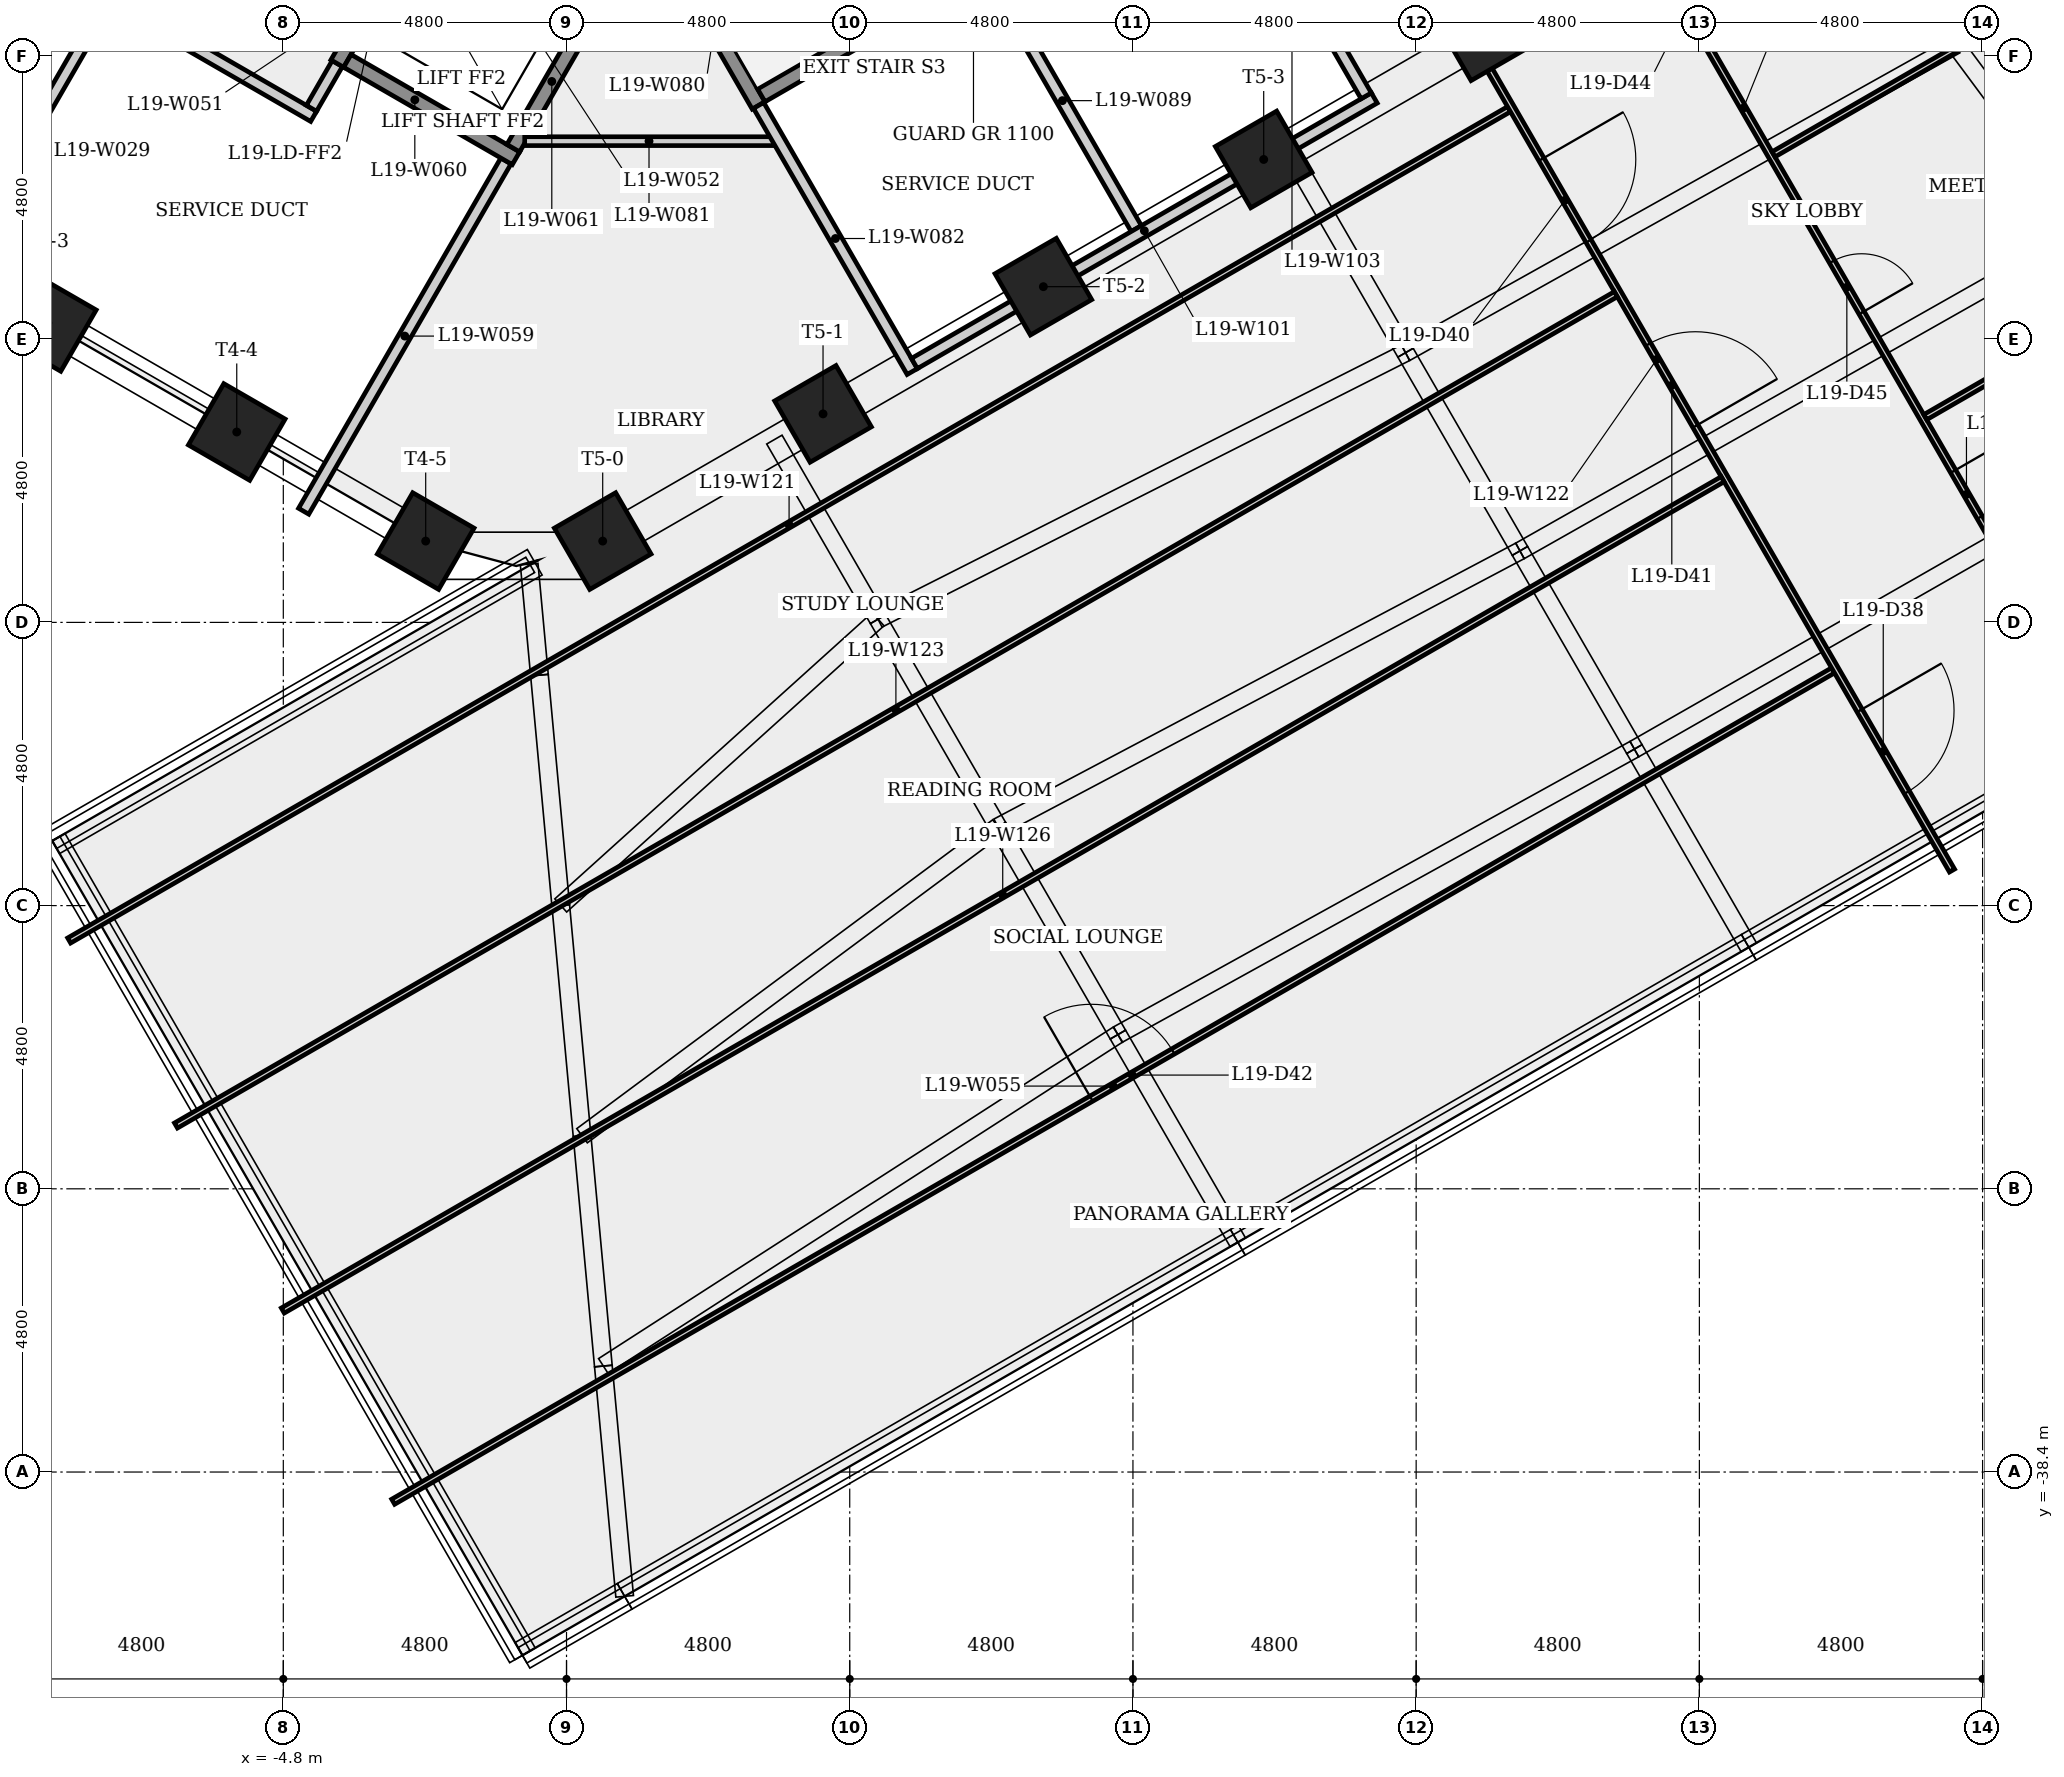
"""IFC4 building model, lengths in metres.
Left out: names, types, materials, properties, quantities, classifications, styles, units other than length and angle.
Written with IfcOpenShell. Run it as: python <this file> out.ifc"""

import sys

from ifc_helpers import new_model, si_unit, direction, frame, frame_2d, origin, origin_2d, place, context, subcontext, project, spatial, rectangle, extrude, element, fill, save


model = new_model("IFC4")
c1 = context("Model", 3, precision=1e-05, world=origin(), true_north=direction((0.0, 1.0)))
c2 = subcontext(c1, "Body", "Model", "MODEL_VIEW")
j1 = project(units=[si_unit("LENGTHUNIT", "METRE"), si_unit("PLANEANGLEUNIT", "RADIAN")], contexts=[c1])
p1 = place(None, origin())
s1 = spatial("IfcSite", under=j1, at=p1, CompositionType="ELEMENT")
p2 = place(p1, origin())
s2 = spatial("IfcBuilding", under=s1, at=p2, CompositionType="ELEMENT")
p3 = place(p2, frame((0.0, 0.0, 74.3)))
s3 = spatial("IfcBuildingStorey", under=s2, at=p3, CompositionType="ELEMENT", Elevation=74.3)
for number, where, z_axis, x_axis in (
    (1, (-8.791, -18.924, 0.0), (0.0, 0.0, 1.0), (-0.5, -0.866, 0.0)),
    (2, (-5.589, -20.773, 0.0), (0.0, 0.0, 1.0), (-0.5, -0.866, 0.0)),
    (3, (-2.387, -22.622, 0.0), (0.0, 0.0, 1.0), (-0.5, -0.866, 0.0)),
    (4, (0.613, -22.622, 0.0), (0.0, 0.0, 1.0), (0.5, -0.866, 0.0)),
    (5, (4.348, -20.466, 0.0), (0.0, 0.0, 1.0), (0.5, -0.866, 0.0)),
    (6, (8.082, -18.31, 0.0), (0.0, 0.0, 1.0), (0.5, -0.866, 0.0)),
    (7, (11.816, -16.154, 0.0), (0.0, 0.0, 1.0), (0.5, -0.866, 0.0)),
    (8, (15.55, -13.998, 0.0), (0.0, 0.0, 1.0), (0.5, -0.866, 0.0)),
):
    element("IfcColumn", number, at=place(p3, frame(where, z_axis=z_axis, x_axis=x_axis)), inside=s3, PredefinedType="COLUMN", context=c2, shape_type="SweptSolid", body=[
        extrude(rectangle(XDim=1.2, YDim=1.2, at=origin_2d()), origin(), (0.0, 0.0, 1.0), 4.0),
    ])
p4 = place(p3, frame((-7.8, -13.51, 0.0), z_axis=(0.0, 0.0, 1.0), x_axis=(-0.499982030767, -0.866035778077, 0.0)))
e9 = element("IfcWall", 9, at=p4, inside=s3, PredefinedType="PLUMBINGWALL", context=c2, shape_type="SweptSolid", body=[
    extrude(rectangle(XDim=5.781, YDim=0.2, at=frame_2d((2.89, 0.0))), origin(), (0.0, 0.0, 1.0), 3.6),
])
p5 = place(p3, frame((-8.356, -13.073, 0.0), z_axis=(0.0, 0.0, 1.0), x_axis=(0.866038532462, -0.499977259774, 0.0)))
e10 = element("IfcWall", 10, at=p5, inside=s3, PredefinedType="PLUMBINGWALL", context=c2, shape_type="SweptSolid", body=[
    extrude(rectangle(XDim=4.7, YDim=0.2, at=frame_2d((2.35, 0.0))), origin(), (0.0, 0.0, 1.0), 3.6),
])
p6 = place(p3, frame((-3.885, -14.529, 0.0), z_axis=(0.0, 0.0, 1.0), x_axis=(-0.499859285417, -0.866106630146, 0.0)))
e11 = element("IfcWall", 11, at=p6, inside=s3, PredefinedType="PLUMBINGWALL", context=c2, shape_type="SweptSolid", body=[
    extrude(rectangle(XDim=0.875, YDim=0.2, at=frame_2d((0.438, 0.0))), origin(), (0.0, 0.0, 1.0), 3.6),
])
p7 = place(p3, frame((-2.41, -11.974, 0.0), z_axis=(0.0, 0.0, 1.0), x_axis=(-0.500001826776, -0.866024349092, 0.0)))
e12 = element("IfcWall", 12, at=p7, inside=s3, PredefinedType="SHEAR", context=c2, shape_type="SweptSolid", body=[
    extrude(rectangle(XDim=2.95, YDim=0.25, at=frame_2d((1.475, 0.0))), origin(), (0.0, 0.0, 1.0), 3.6),
])
p8 = place(p7, frame((0.925, 0.0, 0.0)))
e13 = element("IfcOpeningElement", 13, at=p8, cuts=e12, PredefinedType="OPENING", context=c2, shape_type="SweptSolid", body=[
    extrude(rectangle(XDim=1.1, YDim=2.1, at=frame_2d((0.55, 1.05))), frame((0.0, 0.135, 0.0), z_axis=(0.0, -1.0, 0.0), x_axis=(1.0, 0.0, 0.0)), (0.0, 0.0, 1.0), 0.27),
])
p9 = place(p3, frame((-2.938, -38.904, 0.0), z_axis=(0.0, 0.0, 1.0), x_axis=(0.866026157323, 0.49999869483, 0.0)))
e14 = element("IfcWall", 14, at=p9, inside=s3, PredefinedType="PARTITIONING", context=c2, shape_type="SweptSolid", body=[
    extrude(rectangle(XDim=28.179, YDim=0.1, at=frame_2d((14.089, 0.0))), origin(), (0.0, 0.0, 1.0), 3.6),
])
p10 = place(p9, frame((13.662, 0.0, 0.0)))
e15 = element("IfcOpeningElement", 15, at=p10, cuts=e14, PredefinedType="OPENING", context=c2, shape_type="SweptSolid", body=[
    extrude(rectangle(XDim=1.6, YDim=2.1, at=frame_2d((0.8, 1.05))), frame((0.0, 0.06, 0.0), z_axis=(0.0, -1.0, 0.0), x_axis=(1.0, 0.0, 0.0)), (0.0, 0.0, 1.0), 0.12),
])
p11 = place(p3, frame((-1.027, -16.179, 0.0), z_axis=(0.0, 0.0, 1.0), x_axis=(-0.499984476993, -0.866034365811, 0.0)))
e16 = element("IfcWall", 16, at=p11, inside=s3, PredefinedType="PLUMBINGWALL", context=c2, shape_type="SweptSolid", body=[
    extrude(rectangle(XDim=6.856, YDim=0.2, at=frame_2d((3.428, 0.0))), origin(), (0.0, 0.0, 1.0), 3.6),
])
p12 = place(p3, frame((-0.856, -16.133, 0.0), z_axis=(0.0, 0.0, 1.0), x_axis=(-0.866021716278, 0.500006386895, 0.0)))
e17 = element("IfcWall", 17, at=p12, inside=s3, PredefinedType="SHEAR", context=c2, shape_type="SweptSolid", body=[
    extrude(rectangle(XDim=3.3, YDim=0.25, at=frame_2d((1.65, 0.0))), origin(), (0.0, 0.0, 1.0), 3.6),
])
p13 = place(p3, frame((-0.902, -15.962, 0.0), z_axis=(0.0, 0.0, 1.0), x_axis=(0.499981517636, 0.866036074319, 0.0)))
e18 = element("IfcWall", 18, at=p13, inside=s3, PredefinedType="SHEAR", context=c2, shape_type="SweptSolid", body=[
    extrude(rectangle(XDim=2.61, YDim=0.25, at=frame_2d((1.305, 0.0))), origin(), (0.0, 0.0, 1.0), 3.6),
])
p14 = place(p3, frame((3.256, -15.239, 0.0), z_axis=(0.0, 0.0, 1.0), x_axis=(-0.50002537861, 0.866010750942, 0.0)))
e19 = element("IfcWall", 19, at=p14, inside=s3, PredefinedType="SHEAR", context=c2, shape_type="SweptSolid", body=[
    extrude(rectangle(XDim=3.0, YDim=0.25, at=frame_2d((1.5, 0.0))), origin(), (0.0, 0.0, 1.0), 3.6),
])
p15 = place(p3, frame((3.505, -15.844, 0.0), z_axis=(0.0, 0.0, 1.0), x_axis=(-1.0, 0.0, 0.0)))
e20 = element("IfcWall", 20, at=p15, inside=s3, PredefinedType="PARTITIONING", context=c2, shape_type="SweptSolid", body=[
    extrude(rectangle(XDim=4.214, YDim=0.15, at=frame_2d((2.107, 0.0))), origin(), (0.0, 0.0, 1.0), 3.6),
])
p16 = place(p3, frame((3.256, -15.239, 0.0), z_axis=(0.0, 0.0, 1.0), x_axis=(0.500021393879, -0.866013051671, 0.0)))
e21 = element("IfcWall", 21, at=p16, inside=s3, PredefinedType="PLUMBINGWALL", context=c2, shape_type="SweptSolid", body=[
    extrude(rectangle(XDim=5.208, YDim=0.2, at=frame_2d((2.604, 0.0))), origin(), (0.0, 0.0, 1.0), 3.6),
])
p17 = place(p3, frame((7.153, -12.989, 0.0), z_axis=(0.0, 0.0, 1.0), x_axis=(0.499998165157, -0.866026463129, 0.0)))
e22 = element("IfcWall", 22, at=p17, inside=s3, PredefinedType="PLUMBINGWALL", context=c2, shape_type="SweptSolid", body=[
    extrude(rectangle(XDim=5.008, YDim=0.2, at=frame_2d((2.504, 0.0))), origin(), (0.0, 0.0, 1.0), 3.6),
])
p18 = place(p3, frame((3.301, -15.068, 0.0), z_axis=(0.0, 0.0, 1.0), x_axis=(0.866035036182, 0.499983315828, 0.0)))
e23 = element("IfcWall", 23, at=p18, inside=s3, PredefinedType="SHEAR", context=c2, shape_type="SweptSolid", body=[
    extrude(rectangle(XDim=6.4, YDim=0.25, at=frame_2d((3.2, 0.0))), origin(), (0.0, 0.0, 1.0), 4.0),
])
p19 = place(p3, frame((5.896, -19.612, 0.0), z_axis=(0.0, 0.0, 1.0), x_axis=(0.866024315419, 0.5000018851, 0.0)))
e24 = element("IfcWall", 24, at=p19, inside=s3, PredefinedType="PLUMBINGWALL", context=c2, shape_type="SweptSolid", body=[
    extrude(rectangle(XDim=9.0, YDim=0.2, at=frame_2d((4.5, 0.0))), origin(), (0.0, 0.0, 1.0), 2.675),
])
p20 = place(p3, frame((11.037, -10.717, 0.0), z_axis=(0.0, 0.0, 1.0), x_axis=(0.500005202617, -0.866022400031, 0.0)))
e25 = element("IfcWall", 25, at=p20, inside=s3, PredefinedType="PLUMBINGWALL", context=c2, shape_type="SweptSolid", body=[
    extrude(rectangle(XDim=5.033, YDim=0.2, at=frame_2d((2.516, 0.0))), origin(), (0.0, 0.0, 1.0), 3.6),
])
p21 = place(p3, frame((15.439, -7.476, 0.0), z_axis=(0.0, 0.0, 1.0), x_axis=(0.499994416698, -0.866028627281, 0.0)))
e26 = element("IfcWall", 26, at=p21, inside=s3, PredefinedType="PARTITIONING", context=c2, shape_type="SweptSolid", body=[
    extrude(rectangle(XDim=18.028, YDim=0.1, at=frame_2d((9.014, 0.0))), origin(), (0.0, 0.0, 1.0), 3.6),
])
p22 = place(p21, frame((1.633, 0.0, 0.0)))
e27 = element("IfcOpeningElement", 27, at=p22, cuts=e26, PredefinedType="OPENING", context=c2, shape_type="SweptSolid", body=[
    extrude(rectangle(XDim=0.9, YDim=2.1, at=frame_2d((0.45, 1.05))), frame((0.0, 0.06, 0.0), z_axis=(0.0, -1.0, 0.0), x_axis=(1.0, 0.0, 0.0)), (0.0, 0.0, 1.0), 0.12),
])
p23 = place(p21, frame((6.572, 0.0, 0.0)))
e28 = element("IfcOpeningElement", 28, at=p23, cuts=e26, PredefinedType="OPENING", context=c2, shape_type="SweptSolid", body=[
    extrude(rectangle(XDim=1.0, YDim=2.1, at=frame_2d((0.5, 1.05))), frame((0.0, 0.06, 0.0), z_axis=(0.0, -1.0, 0.0), x_axis=(1.0, 0.0, 0.0)), (0.0, 0.0, 1.0), 0.12),
])
p24 = place(p21, frame((12.02, 0.0, 0.0)))
e29 = element("IfcOpeningElement", 29, at=p24, cuts=e26, PredefinedType="OPENING", context=c2, shape_type="SweptSolid", body=[
    extrude(rectangle(XDim=1.0, YDim=2.1, at=frame_2d((0.5, 1.05))), frame((0.0, 0.06, 0.0), z_axis=(0.0, -1.0, 0.0), x_axis=(1.0, 0.0, 0.0)), (0.0, 0.0, 1.0), 0.12),
])
p25 = place(p21, frame((16.125, 0.0, 0.0)))
e30 = element("IfcOpeningElement", 30, at=p25, cuts=e26, PredefinedType="OPENING", context=c2, shape_type="SweptSolid", body=[
    extrude(rectangle(XDim=0.9, YDim=2.1, at=frame_2d((0.45, 1.05))), frame((0.0, 0.06, 0.0), z_axis=(0.0, -1.0, 0.0), x_axis=(1.0, 0.0, 0.0)), (0.0, 0.0, 1.0), 0.12),
])
p26 = place(p3, frame((15.974, -15.302, 0.0), z_axis=(0.0, 0.0, 1.0), x_axis=(-0.866022405705, -0.500005192789, 0.0)))
e31 = element("IfcWall", 31, at=p26, inside=s3, PredefinedType="PARTITIONING", context=c2, shape_type="SweptSolid", body=[
    extrude(rectangle(XDim=28.179, YDim=0.1, at=frame_2d((14.089, 0.0))), origin(), (0.0, 0.0, 1.0), 3.6),
])
p27 = place(p3, frame((13.476, -10.876, 0.0), z_axis=(0.0, 0.0, 1.0), x_axis=(0.500008654708, -0.866020406929, 0.0)))
e32 = element("IfcWall", 32, at=p27, inside=s3, PredefinedType="PARTITIONING", context=c2, shape_type="SweptSolid", body=[
    extrude(rectangle(XDim=20.011, YDim=0.1, at=frame_2d((10.005, 0.0))), origin(), (0.0, 0.0, 1.0), 3.6),
])
p28 = place(p27, frame((16.88, 0.0, 0.0)))
e33 = element("IfcOpeningElement", 33, at=p28, cuts=e32, PredefinedType="OPENING", context=c2, shape_type="SweptSolid", body=[
    extrude(rectangle(XDim=1.6, YDim=2.1, at=frame_2d((0.8, 1.05))), frame((0.0, 0.06, 0.0), z_axis=(0.0, -1.0, 0.0), x_axis=(1.0, 0.0, 0.0)), (0.0, 0.0, 1.0), 0.12),
])
p29 = place(p27, frame((1.426, 0.0, 0.0)))
e34 = element("IfcOpeningElement", 34, at=p29, cuts=e32, PredefinedType="OPENING", context=c2, shape_type="SweptSolid", body=[
    extrude(rectangle(XDim=1.6, YDim=2.1, at=frame_2d((0.8, 1.05))), frame((0.0, 0.06, 0.0), z_axis=(0.0, -1.0, 0.0), x_axis=(1.0, 0.0, 0.0)), (0.0, 0.0, 1.0), 0.12),
])
p30 = place(p27, frame((6.092, 0.0, 0.0)))
e35 = element("IfcOpeningElement", 35, at=p30, cuts=e32, PredefinedType="OPENING", context=c2, shape_type="SweptSolid", body=[
    extrude(rectangle(XDim=1.6, YDim=2.1, at=frame_2d((0.8, 1.05))), frame((0.0, 0.06, 0.0), z_axis=(0.0, -1.0, 0.0), x_axis=(1.0, 0.0, 0.0)), (0.0, 0.0, 1.0), 0.12),
])
p31 = place(p27, frame((9.713, 0.0, 0.0)))
e36 = element("IfcOpeningElement", 36, at=p31, cuts=e32, PredefinedType="OPENING", context=c2, shape_type="SweptSolid", body=[
    extrude(rectangle(XDim=1.6, YDim=2.1, at=frame_2d((0.8, 1.05))), frame((0.0, 0.06, 0.0), z_axis=(0.0, -1.0, 0.0), x_axis=(1.0, 0.0, 0.0)), (0.0, 0.0, 1.0), 0.12),
])
for number, where, z_axis, x_axis in (
    (37, (17.784, -18.438, 0.0), (0.0, 0.0, 1.0), (-0.866, -0.5, 0.0)),
    (38, (19.595, -21.574, 0.0), (0.0, 0.0, 1.0), (-0.866, -0.5, 0.0)),
):
    element("IfcWall", number, at=place(p3, frame(where, z_axis=z_axis, x_axis=x_axis)), inside=s3, PredefinedType="PARTITIONING", context=c2, shape_type="SweptSolid", body=[
        extrude(rectangle(XDim=28.178, YDim=0.1, at=frame_2d((14.089, 0.0))), origin(), (0.0, 0.0, 1.0), 3.275),
    ])
p32 = place(p3, frame((26.964, -12.31, 0.0), z_axis=(0.0, 0.0, 1.0), x_axis=(-0.866032992878, -0.499986855073, 0.0)))
e39 = element("IfcWall", 39, at=p32, inside=s3, PredefinedType="PARTITIONING", context=c2, shape_type="SweptSolid", body=[
    extrude(rectangle(XDim=7.513, YDim=0.1, at=frame_2d((3.757, 0.0))), origin(), (0.0, 0.0, 1.0), 3.275),
])
p33 = place(p3, frame((29.535, -16.764, 0.0), z_axis=(0.0, 0.0, 1.0), x_axis=(-0.866032992878, -0.499986855073, 0.0)))
e40 = element("IfcWall", 40, at=p33, inside=s3, PredefinedType="PARTITIONING", context=c2, shape_type="SweptSolid", body=[
    extrude(rectangle(XDim=7.513, YDim=0.1, at=frame_2d((3.757, 0.0))), origin(), (0.0, 0.0, 1.0), 3.6),
])
p34 = place(p28, origin())
e41 = element("IfcDoor", 41, at=p34, inside=s3, OperationType="SINGLE_SWING_LEFT", PredefinedType="DOOR", context=c2, shape_type="SweptSolid", body=[
    extrude(rectangle(XDim=1.6, YDim=2.1, at=frame_2d((0.8, 1.05))), frame((0.0, 0.025, 0.0), z_axis=(0.0, -1.0, 0.0), x_axis=(1.0, 0.0, 0.0)), (0.0, 0.0, 1.0), 0.05),
])
fill(e33, e41)
p35 = place(p30, origin())
e42 = element("IfcDoor", 42, at=p35, inside=s3, OperationType="SINGLE_SWING_LEFT", PredefinedType="DOOR", context=c2, shape_type="SweptSolid", body=[
    extrude(rectangle(XDim=1.6, YDim=2.1, at=frame_2d((0.8, 1.05))), frame((0.0, 0.025, 0.0), z_axis=(0.0, -1.0, 0.0), x_axis=(1.0, 0.0, 0.0)), (0.0, 0.0, 1.0), 0.05),
])
fill(e35, e42)
p36 = place(p31, origin())
e43 = element("IfcDoor", 43, at=p36, inside=s3, OperationType="SINGLE_SWING_RIGHT", PredefinedType="DOOR", context=c2, shape_type="SweptSolid", body=[
    extrude(rectangle(XDim=1.6, YDim=2.1, at=frame_2d((0.8, 1.05))), frame((0.0, 0.025, 0.0), z_axis=(0.0, -1.0, 0.0), x_axis=(1.0, 0.0, 0.0)), (0.0, 0.0, 1.0), 0.05),
])
fill(e36, e43)
p37 = place(p10, origin())
e44 = element("IfcDoor", 44, at=p37, inside=s3, OperationType="SINGLE_SWING_LEFT", PredefinedType="DOOR", context=c2, shape_type="SweptSolid", body=[
    extrude(rectangle(XDim=1.6, YDim=2.1, at=frame_2d((0.8, 1.05))), frame((0.0, 0.025, 0.0), z_axis=(0.0, -1.0, 0.0), x_axis=(1.0, 0.0, 0.0)), (0.0, 0.0, 1.0), 0.05),
])
fill(e15, e44)
p38 = place(p24, origin())
e45 = element("IfcDoor", 45, at=p38, inside=s3, OperationType="SINGLE_SWING_RIGHT", PredefinedType="DOOR", context=c2, shape_type="SweptSolid", body=[
    extrude(rectangle(XDim=1.0, YDim=2.1, at=frame_2d((0.5, 1.05))), frame((0.0, 0.025, 0.0), z_axis=(0.0, -1.0, 0.0), x_axis=(1.0, 0.0, 0.0)), (0.0, 0.0, 1.0), 0.05),
])
fill(e29, e45)
p39 = place(p25, origin())
e46 = element("IfcDoor", 46, at=p39, inside=s3, OperationType="SINGLE_SWING_LEFT", PredefinedType="DOOR", context=c2, shape_type="SweptSolid", body=[
    extrude(rectangle(XDim=0.9, YDim=2.1, at=frame_2d((0.45, 1.05))), frame((0.0, 0.025, 0.0), z_axis=(0.0, -1.0, 0.0), x_axis=(1.0, 0.0, 0.0)), (0.0, 0.0, 1.0), 0.05),
])
fill(e30, e46)
save(model, sys.argv[1])
